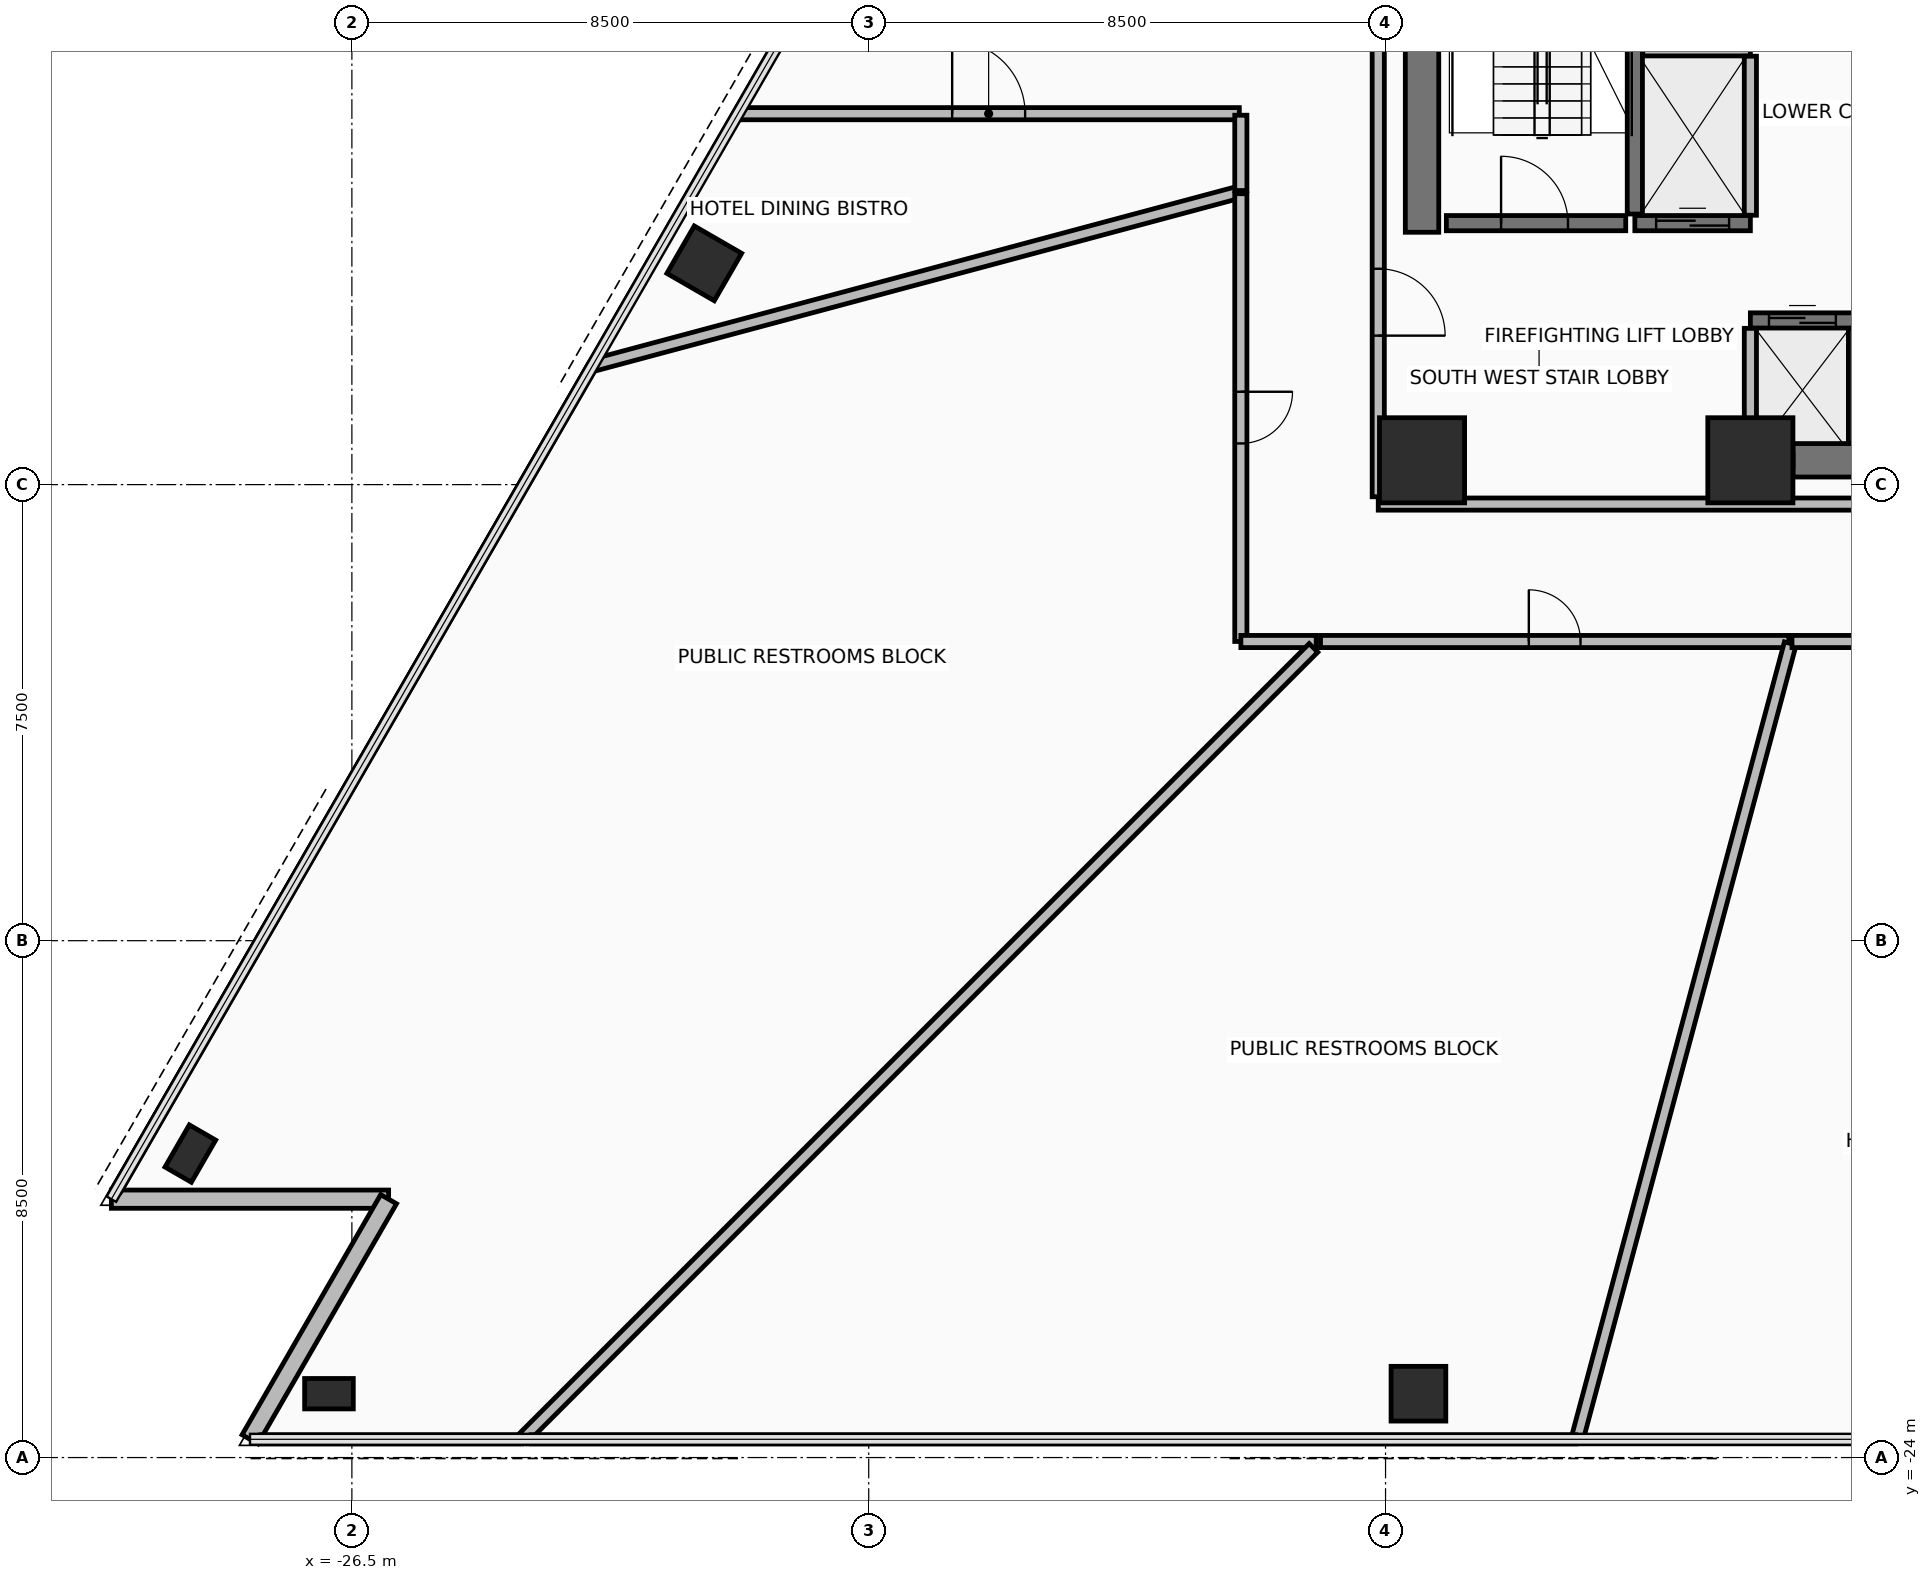
"""IFC4 building model, lengths in metres.
Left out: names, types, materials, properties, quantities, classifications, styles, units other than length and angle.
Written with IfcOpenShell. Run it as: python <this file> out.ifc"""

import sys

from ifc_helpers import new_model, si_unit, direction, frame, frame_2d, origin, origin_2d, place, context, subcontext, project, spatial, rectangle, hollow_rectangle, extrude, element, fill, save


model = new_model("IFC4")
c1 = context("Model", 3, precision=1e-05, world=origin(), true_north=direction((0.0, 1.0)))
c2 = subcontext(c1, "Body", "Model", "MODEL_VIEW")
j1 = project(units=[si_unit("LENGTHUNIT", "METRE"), si_unit("PLANEANGLEUNIT", "RADIAN")], contexts=[c1])
p1 = place(None, origin())
s1 = spatial("IfcSite", under=j1, at=p1, CompositionType="ELEMENT")
p2 = place(p1, origin())
s2 = spatial("IfcBuilding", under=s1, at=p2, CompositionType="ELEMENT")
p3 = place(p2, frame((0.0, 0.0, 52.25)))
s3 = spatial("IfcBuildingStorey", under=s2, at=p3, CompositionType="ELEMENT", Elevation=52.25)
for number, where, z_axis, x_axis in (
    (1, (-8.9, -7.6, 0.0), (0.0, 0.0, 1.0), (1.0, 0.0, 0.0)),
    (2, (-3.5, -7.6, 0.0), (0.0, 0.0, 1.0), (1.0, 0.0, 0.0)),
):
    element("IfcColumn", number, at=place(p3, frame(where, z_axis=z_axis, x_axis=x_axis)), inside=s3, PredefinedType="COLUMN", context=c2, shape_type="SweptSolid", body=[
        extrude(rectangle(XDim=1.4, YDim=1.4, at=origin_2d()), origin(), (0.0, 0.0, 1.0), 4.75),
    ])
p4 = place(p3, frame((-20.705, -4.361, 0.0), z_axis=(0.0, 0.0, 1.0), x_axis=(0.500001511499, 0.866024531118, 0.0)))
e3 = element("IfcColumn", 3, at=p4, inside=s3, PredefinedType="COLUMN", context=c2, shape_type="SweptSolid", body=[
    extrude(hollow_rectangle(XDim=0.9, YDim=0.9, WallThickness=0.05, at=origin_2d()), origin(), (0.0, 0.0, 1.0), 4.75),
])
for number, where, z_axis, x_axis in (
    (4, (-29.157, -19.001, 0.0), (0.0, 0.0, 1.0), (0.5, 0.866, 0.0)),
    (5, (-26.877, -22.95, 0.0), (0.0, 0.0, 1.0), (1.0, 0.0, 0.0)),
):
    element("IfcColumn", number, at=place(p3, frame(where, z_axis=z_axis, x_axis=x_axis)), inside=s3, PredefinedType="COLUMN", context=c2, shape_type="SweptSolid", body=[
        extrude(hollow_rectangle(XDim=0.5, YDim=0.8, WallThickness=0.04, at=origin_2d()), origin(), (0.0, 0.0, 1.0), 4.75),
    ])
p5 = place(p3, frame((-8.959, -22.95, 0.0), z_axis=(0.0, 0.0, 1.0), x_axis=(1.0, 0.0, 0.0)))
e6 = element("IfcColumn", 6, at=p5, inside=s3, PredefinedType="COLUMN", context=c2, shape_type="SweptSolid", body=[
    extrude(hollow_rectangle(XDim=0.9, YDim=0.9, WallThickness=0.05, at=origin_2d()), origin(), (0.0, 0.0, 1.0), 4.75),
])
p6 = place(p3, frame((-30.456, -19.751, 0.0), z_axis=(0.0, 0.0, 1.0), x_axis=(1.0, 0.0, 0.0)))
e7 = element("IfcWall", 7, at=p6, inside=s3, PredefinedType="STANDARD", context=c2, shape_type="SweptSolid", body=[
    extrude(rectangle(XDim=4.56, YDim=0.3, at=frame_2d((2.28, 0.0))), origin(), (0.0, 0.0, 1.0), 2.255),
])
p7 = place(p3, frame((-25.896, -19.751, 0.0), z_axis=(0.0, 0.0, 1.0), x_axis=(-0.500014431597, -0.866017071537, 0.0)))
e8 = element("IfcWall", 8, at=p7, inside=s3, PredefinedType="STANDARD", context=c2, shape_type="SweptSolid", body=[
    extrude(rectangle(XDim=4.56, YDim=0.3, at=frame_2d((2.28, 0.0))), origin(), (0.0, 0.0, 1.0), 2.255),
])
p8 = place(p3, frame((-2.8, -7.6, 0.0), z_axis=(0.0, 0.0, 1.0), x_axis=(1.0, 0.0, 0.0)))
e9 = element("IfcWall", 9, at=p8, inside=s3, PredefinedType="SHEAR", context=c2, shape_type="SweptSolid", body=[
    extrude(rectangle(XDim=5.38, YDim=0.55, at=frame_2d((2.69, 0.0))), origin(), (0.0, 0.0, 1.0), 4.56),
])
p9 = place(p3, frame((-8.9, -3.85, 0.0), z_axis=(0.0, 0.0, 1.0), x_axis=(0.0, 1.0, 0.0)))
e10 = element("IfcWall", 10, at=p9, inside=s3, PredefinedType="SHEAR", context=c2, shape_type="SweptSolid", body=[
    extrude(rectangle(XDim=10.7, YDim=0.55, at=frame_2d((5.35, 0.0))), origin(), (0.0, 0.0, 1.0), 4.56),
])
p10 = place(p3, frame((-9.62, -8.32, 0.0), z_axis=(0.0, 0.0, 1.0), x_axis=(1.0, 0.0, 0.0)))
e11 = element("IfcWall", 11, at=p10, inside=s3, PredefinedType="PARTITIONING", context=c2, shape_type="SweptSolid", body=[
    extrude(rectangle(XDim=19.24, YDim=0.2, at=frame_2d((9.62, 0.0))), origin(), (0.0, 0.0, 1.0), 2.355),
])
p11 = place(p10, frame((13.97, 0.0, 0.0)))
e12 = element("IfcOpeningElement", 12, at=p11, cuts=e11, PredefinedType="OPENING", context=c2, shape_type="SweptSolid", body=[
    extrude(rectangle(XDim=0.9, YDim=2.1, at=frame_2d((0.45, 1.05))), frame((0.0, 0.11, 0.0), z_axis=(0.0, -1.0, 0.0), x_axis=(1.0, 0.0, 0.0)), (0.0, 0.0, 1.0), 0.22),
])
p12 = place(p3, frame((-9.62, 8.2, 0.0), z_axis=(0.0, 0.0, 1.0), x_axis=(0.0, -1.0, 0.0)))
e13 = element("IfcWall", 13, at=p12, inside=s3, PredefinedType="PARTITIONING", context=c2, shape_type="SweptSolid", body=[
    extrude(rectangle(XDim=16.4, YDim=0.2, at=frame_2d((8.2, 0.0))), origin(), (0.0, 0.0, 1.0), 2.355),
])
p13 = place(p12, frame((12.65, 0.0, 0.0)))
e14 = element("IfcOpeningElement", 14, at=p13, cuts=e13, PredefinedType="OPENING", context=c2, shape_type="SweptSolid", body=[
    extrude(rectangle(XDim=1.1, YDim=2.15, at=frame_2d((0.55, 1.075))), frame((0.0, 0.11, 0.0), z_axis=(0.0, -1.0, 0.0), x_axis=(1.0, 0.0, 0.0)), (0.0, 0.0, 1.0), 0.22),
])
p14 = place(p3, frame((-5.4, -3.55, 0.0), z_axis=(0.0, 0.0, 1.0), x_axis=(0.0, 1.0, 0.0)))
e15 = element("IfcWall", 15, at=p14, inside=s3, PredefinedType="SHEAR", context=c2, shape_type="SweptSolid", body=[
    extrude(rectangle(XDim=7.3, YDim=0.25, at=frame_2d((3.65, 0.0))), origin(), (0.0, 0.0, 1.0), 4.56),
])
p15 = place(p3, frame((-8.5, -3.7, 0.0), z_axis=(0.0, 0.0, 1.0), x_axis=(1.0, 0.0, 0.0)))
e16 = element("IfcWall", 16, at=p15, inside=s3, PredefinedType="SHEAR", context=c2, shape_type="SweptSolid", body=[
    extrude(rectangle(XDim=2.95, YDim=0.25, at=frame_2d((1.475, 0.0))), origin(), (0.0, 0.0, 1.0), 4.56),
])
p16 = place(p15, frame((0.9, 0.0, 0.0)))
e17 = element("IfcOpeningElement", 17, at=p16, cuts=e16, PredefinedType="OPENING", context=c2, shape_type="SweptSolid", body=[
    extrude(rectangle(XDim=1.1, YDim=2.15, at=frame_2d((0.55, 1.075))), frame((0.0, 0.135, 0.0), z_axis=(0.0, -1.0, 0.0), x_axis=(1.0, 0.0, 0.0)), (0.0, 0.0, 1.0), 0.27),
])
p17 = place(p3, frame((-3.5, -5.3, 0.0), z_axis=(0.0, 0.0, 1.0), x_axis=(1.0, 0.0, 0.0)))
e18 = element("IfcWall", 18, at=p17, inside=s3, PredefinedType="SHEAR", context=c2, shape_type="SweptSolid", body=[
    extrude(rectangle(XDim=1.712, YDim=0.25, at=frame_2d((0.856, 0.0))), origin(), (0.0, 0.0, 1.0), 4.56),
])
p18 = place(p17, frame((0.306, 0.0, 0.0)))
e19 = element("IfcOpeningElement", 19, at=p18, cuts=e18, PredefinedType="OPENING", context=c2, shape_type="SweptSolid", body=[
    extrude(rectangle(XDim=1.1, YDim=2.2, at=frame_2d((0.55, 1.1))), frame((0.0, 0.135, 0.0), z_axis=(0.0, -1.0, 0.0), x_axis=(1.0, 0.0, 0.0)), (0.0, 0.0, 1.0), 0.27),
])
p19 = place(p3, frame((-3.5, -7.6, 0.0), z_axis=(0.0, 0.0, 1.0), x_axis=(1.0, 0.0, 0.0)))
e20 = element("IfcWall", 20, at=p19, inside=s3, PredefinedType="PARTITIONING", context=c2, shape_type="SweptSolid", body=[
    extrude(rectangle(XDim=0.7, YDim=0.2, at=frame_2d((0.35, 0.0))), origin(), (0.0, 0.0, 1.0), 3.755),
])
p20 = place(p3, frame((-3.5, -7.495, 0.0), z_axis=(0.0, 0.0, 1.0), x_axis=(0.0, 1.0, 0.0)))
e21 = element("IfcWall", 21, at=p20, inside=s3, PredefinedType="PARTITIONING", context=c2, shape_type="SweptSolid", body=[
    extrude(rectangle(XDim=2.065, YDim=0.2, at=frame_2d((1.033, 0.0))), origin(), (0.0, 0.0, 1.0), 3.755),
])
p21 = place(p3, frame((-1.788, -7.32, 0.0), z_axis=(0.0, 0.0, 1.0), x_axis=(0.0, 1.0, 0.0)))
e22 = element("IfcWall", 22, at=p21, inside=s3, PredefinedType="PARTITIONING", context=c2, shape_type="SweptSolid", body=[
    extrude(rectangle(XDim=1.89, YDim=0.2, at=frame_2d((0.945, 0.0))), origin(), (0.0, 0.0, 1.0), 4.56),
])
p22 = place(p3, frame((-5.4, -3.7, 0.0), z_axis=(0.0, 0.0, 1.0), x_axis=(1.0, 0.0, 0.0)))
e23 = element("IfcWall", 23, at=p22, inside=s3, PredefinedType="SHEAR", context=c2, shape_type="SweptSolid", body=[
    extrude(rectangle(XDim=1.9, YDim=0.25, at=frame_2d((0.95, 0.0))), origin(), (0.0, 0.0, 1.0), 4.56),
])
p23 = place(p22, frame((0.35, 0.0, 0.0)))
e24 = element("IfcOpeningElement", 24, at=p23, cuts=e23, PredefinedType="OPENING", context=c2, shape_type="SweptSolid", body=[
    extrude(rectangle(XDim=1.2, YDim=2.2, at=frame_2d((0.6, 1.1))), frame((0.0, 0.135, 0.0), z_axis=(0.0, -1.0, 0.0), x_axis=(1.0, 0.0, 0.0)), (0.0, 0.0, 1.0), 0.27),
])
p24 = place(p3, frame((-5.27, -0.85, 0.0), z_axis=(0.0, 0.0, 1.0), x_axis=(1.0, 0.0, 0.0)))
e25 = element("IfcWall", 25, at=p24, inside=s3, PredefinedType="PARTITIONING", context=c2, shape_type="SweptSolid", body=[
    extrude(rectangle(XDim=1.77, YDim=0.2, at=frame_2d((0.885, 0.0))), origin(), (0.0, 0.0, 1.0), 4.56),
])
p25 = place(p3, frame((-3.5, -3.57, 0.0), z_axis=(0.0, 0.0, 1.0), x_axis=(0.0, 1.0, 0.0)))
e26 = element("IfcWall", 26, at=p25, inside=s3, PredefinedType="PARTITIONING", context=c2, shape_type="SweptSolid", body=[
    extrude(rectangle(XDim=2.615, YDim=0.2, at=frame_2d((1.308, 0.0))), origin(), (0.0, 0.0, 1.0), 4.56),
])
p26 = place(p3, frame((-30.366, -19.596, 0.0), z_axis=(0.0, 0.0, 1.0), x_axis=(0.499991293932, 0.866030430177, 0.0)))
e27 = element("IfcWall", 27, at=p26, inside=s3, PredefinedType="PARTITIONING", context=c2, shape_type="SweptSolid", body=[
    extrude(rectangle(XDim=15.643, YDim=0.15, at=frame_2d((7.822, 0.0))), origin(), (0.0, 0.0, 1.0), 4.56),
])
p27 = place(p3, frame((-22.53, -6.037, 0.0), z_axis=(0.0, 0.0, 1.0), x_axis=(0.965922374415, 0.258831927328, 0.0)))
e28 = element("IfcWall", 28, at=p27, inside=s3, PredefinedType="PARTITIONING", context=c2, shape_type="SweptSolid", body=[
    extrude(rectangle(XDim=10.992, YDim=0.2, at=frame_2d((5.496, 0.0))), origin(), (0.0, 0.0, 1.0), 2.255),
])
p28 = place(p3, frame((-11.88, -3.216, 0.0), z_axis=(0.0, 0.0, 1.0), x_axis=(0.0, -1.0, 0.0)))
e29 = element("IfcWall", 29, at=p28, inside=s3, PredefinedType="PARTITIONING", context=c2, shape_type="SweptSolid", body=[
    extrude(rectangle(XDim=7.364, YDim=0.2, at=frame_2d((3.682, 0.0))), origin(), (0.0, 0.0, 1.0), 2.355),
])
p29 = place(p28, frame((3.257, 0.0, 0.0)))
e30 = element("IfcOpeningElement", 30, at=p29, cuts=e29, PredefinedType="OPENING", context=c2, shape_type="SweptSolid", body=[
    extrude(rectangle(XDim=0.85, YDim=2.1, at=frame_2d((0.425, 1.05))), frame((0.0, 0.11, 0.0), z_axis=(0.0, -1.0, 0.0), x_axis=(1.0, 0.0, 0.0)), (0.0, 0.0, 1.0), 0.22),
])
p30 = place(p3, frame((-11.879, -10.58, 0.0), z_axis=(0.0, 0.0, 1.0), x_axis=(1.0, 0.0, 0.0)))
e31 = element("IfcWall", 31, at=p30, inside=s3, PredefinedType="PARTITIONING", context=c2, shape_type="SweptSolid", body=[
    extrude(rectangle(XDim=1.239, YDim=0.2, at=frame_2d((0.62, 0.0))), origin(), (0.0, 0.0, 1.0), 2.355),
])
p31 = place(p3, frame((-10.685, -10.685, 0.0), z_axis=(0.0, 0.0, 1.0), x_axis=(-0.707106781187, -0.707106781187, 0.0)))
e32 = element("IfcWall", 32, at=p31, inside=s3, PredefinedType="PARTITIONING", context=c2, shape_type="SweptSolid", body=[
    extrude(rectangle(XDim=18.396, YDim=0.2, at=frame_2d((9.198, 0.0))), origin(), (0.0, 0.0, 1.0), 2.255),
])
p32 = place(p3, frame((-23.71, -23.7, 0.0), z_axis=(0.0, 0.0, 1.0), x_axis=(-1.0, 0.0, 0.0)))
e33 = element("IfcWall", 33, at=p32, inside=s3, PredefinedType="PARTITIONING", context=c2, shape_type="SweptSolid", body=[
    extrude(rectangle(XDim=4.286, YDim=0.15, at=frame_2d((2.143, 0.0))), origin(), (0.0, 0.0, 1.0), 3.055),
])
p33 = place(p3, frame((-10.57, -10.58, 0.0), z_axis=(0.0, 0.0, 1.0), x_axis=(1.0, 0.0, 0.0)))
e34 = element("IfcWall", 34, at=p33, inside=s3, PredefinedType="PARTITIONING", context=c2, shape_type="SweptSolid", body=[
    extrude(rectangle(XDim=7.702, YDim=0.2, at=frame_2d((3.851, 0.0))), origin(), (0.0, 0.0, 1.0), 2.355),
])
p34 = place(p33, frame((3.426, 0.0, 0.0)))
e35 = element("IfcOpeningElement", 35, at=p34, cuts=e34, PredefinedType="OPENING", context=c2, shape_type="SweptSolid", body=[
    extrude(rectangle(XDim=0.85, YDim=2.1, at=frame_2d((0.425, 1.05))), frame((0.0, 0.11, 0.0), z_axis=(0.0, -1.0, 0.0), x_axis=(1.0, 0.0, 0.0)), (0.0, 0.0, 1.0), 0.22),
])
p35 = place(p3, frame((-2.843, -10.612, 0.0), z_axis=(0.0, 0.0, 1.0), x_axis=(-0.25882927933, -0.965923083978, 0.0)))
e36 = element("IfcWall", 36, at=p35, inside=s3, PredefinedType="PARTITIONING", context=c2, shape_type="SweptSolid", body=[
    extrude(rectangle(XDim=13.531, YDim=0.2, at=frame_2d((6.766, 0.0))), origin(), (0.0, 0.0, 1.0), 2.255),
])
p36 = place(p3, frame((-6.37, -23.7, 0.0), z_axis=(0.0, 0.0, 1.0), x_axis=(-1.0, 0.0, 0.0)))
e37 = element("IfcWall", 37, at=p36, inside=s3, PredefinedType="PARTITIONING", context=c2, shape_type="SweptSolid", body=[
    extrude(rectangle(XDim=17.182, YDim=0.15, at=frame_2d((8.591, 0.0))), origin(), (0.0, 0.0, 1.0), 2.355),
])
p37 = place(p3, frame((-20.15, -1.9, 0.0), z_axis=(0.0, 0.0, 1.0), x_axis=(1.0, 0.0, 0.0)))
e38 = element("IfcWall", 38, at=p37, inside=s3, PredefinedType="PARTITIONING", context=c2, shape_type="SweptSolid", body=[
    extrude(rectangle(XDim=8.245, YDim=0.2, at=frame_2d((4.122, 0.0))), origin(), (0.0, 0.0, 1.0), 2.255),
])
p38 = place(p37, frame((3.522, 0.0, 0.0)))
e39 = element("IfcOpeningElement", 39, at=p38, cuts=e38, PredefinedType="OPENING", context=c2, shape_type="SweptSolid", body=[
    extrude(rectangle(XDim=1.2, YDim=2.15, at=frame_2d((0.6, 1.075))), frame((0.0, 0.11, 0.0), z_axis=(0.0, -1.0, 0.0), x_axis=(1.0, 0.0, 0.0)), (0.0, 0.0, 1.0), 0.22),
])
p39 = place(p3, frame((-11.88, -1.925, 0.0), z_axis=(0.0, 0.0, 1.0), x_axis=(0.0, -1.0, 0.0)))
e40 = element("IfcWall", 40, at=p39, inside=s3, PredefinedType="PARTITIONING", context=c2, shape_type="SweptSolid", body=[
    extrude(rectangle(XDim=1.239, YDim=0.2, at=frame_2d((0.62, 0.0))), origin(), (0.0, 0.0, 1.0), 4.56),
])
p40 = place(p3, frame((-2.816, -10.58, 0.0), z_axis=(0.0, 0.0, 1.0), x_axis=(1.0, 0.0, 0.0)))
e41 = element("IfcWall", 41, at=p40, inside=s3, PredefinedType="PARTITIONING", context=c2, shape_type="SweptSolid", body=[
    extrude(rectangle(XDim=5.631, YDim=0.2, at=frame_2d((2.816, 0.0))), origin(), (0.0, 0.0, 1.0), 4.56),
])
p41 = place(p40, frame((2.216, 0.0, 0.0)))
e42 = element("IfcOpeningElement", 42, at=p41, cuts=e41, PredefinedType="OPENING", context=c2, shape_type="SweptSolid", body=[
    extrude(rectangle(XDim=1.2, YDim=2.15, at=frame_2d((0.6, 1.075))), frame((0.0, 0.11, 0.0), z_axis=(0.0, -1.0, 0.0), x_axis=(1.0, 0.0, 0.0)), (0.0, 0.0, 1.0), 0.22),
])
p42 = place(p13, frame((1.1, 0.0, 0.0), z_axis=(0.0, 0.0, 1.0), x_axis=(-1.0, 0.0, 0.0)))
e43 = element("IfcDoor", 43, at=p42, inside=s3, OperationType="SINGLE_SWING_LEFT", PredefinedType="DOOR", context=c2, shape_type="SweptSolid", body=[
    extrude(rectangle(XDim=1.1, YDim=2.15, at=frame_2d((0.55, 1.075))), frame((0.0, 0.025, 0.0), z_axis=(0.0, -1.0, 0.0), x_axis=(1.0, 0.0, 0.0)), (0.0, 0.0, 1.0), 0.05),
])
fill(e14, e43)
p43 = place(p16, origin())
e44 = element("IfcDoor", 44, at=p43, inside=s3, OperationType="SINGLE_SWING_LEFT", PredefinedType="DOOR", context=c2, shape_type="SweptSolid", body=[
    extrude(rectangle(XDim=1.1, YDim=2.15, at=frame_2d((0.55, 1.075))), frame((0.0, 0.025, 0.0), z_axis=(0.0, -1.0, 0.0), x_axis=(1.0, 0.0, 0.0)), (0.0, 0.0, 1.0), 0.05),
])
fill(e17, e44)
p44 = place(p18, origin())
e45 = element("IfcDoor", 45, at=p44, inside=s3, OperationType="SLIDING_TO_LEFT", PredefinedType="DOOR", context=c2, shape_type="SweptSolid", body=[
    extrude(rectangle(XDim=1.1, YDim=2.2, at=frame_2d((0.55, 1.1))), frame((0.0, 0.025, 0.0), z_axis=(0.0, -1.0, 0.0), x_axis=(1.0, 0.0, 0.0)), (0.0, 0.0, 1.0), 0.05),
])
fill(e19, e45)
p45 = place(p23, origin())
e46 = element("IfcDoor", 46, at=p45, inside=s3, OperationType="SLIDING_TO_RIGHT", PredefinedType="DOOR", context=c2, shape_type="SweptSolid", body=[
    extrude(rectangle(XDim=1.2, YDim=2.2, at=frame_2d((0.6, 1.1))), frame((0.0, 0.025, 0.0), z_axis=(0.0, -1.0, 0.0), x_axis=(1.0, 0.0, 0.0)), (0.0, 0.0, 1.0), 0.05),
])
fill(e24, e46)
p46 = place(p29, origin())
e47 = element("IfcDoor", 47, at=p46, inside=s3, OperationType="SINGLE_SWING_RIGHT", PredefinedType="DOOR", context=c2, shape_type="SweptSolid", body=[
    extrude(rectangle(XDim=0.85, YDim=2.1, at=frame_2d((0.425, 1.05))), frame((0.0, 0.025, 0.0), z_axis=(0.0, -1.0, 0.0), x_axis=(1.0, 0.0, 0.0)), (0.0, 0.0, 1.0), 0.05),
])
fill(e30, e47)
p47 = place(p34, origin())
e48 = element("IfcDoor", 48, at=p47, inside=s3, OperationType="SINGLE_SWING_RIGHT", PredefinedType="DOOR", context=c2, shape_type="SweptSolid", body=[
    extrude(rectangle(XDim=0.85, YDim=2.1, at=frame_2d((0.425, 1.05))), frame((0.0, 0.025, 0.0), z_axis=(0.0, -1.0, 0.0), x_axis=(1.0, 0.0, 0.0)), (0.0, 0.0, 1.0), 0.05),
])
fill(e35, e48)
p48 = place(p38, origin())
e49 = element("IfcDoor", 49, at=p48, inside=s3, OperationType="SINGLE_SWING_LEFT", PredefinedType="DOOR", context=c2, shape_type="SweptSolid", body=[
    extrude(rectangle(XDim=1.2, YDim=2.15, at=frame_2d((0.6, 1.075))), frame((0.0, 0.025, 0.0), z_axis=(0.0, -1.0, 0.0), x_axis=(1.0, 0.0, 0.0)), (0.0, 0.0, 1.0), 0.05),
])
fill(e39, e49)
save(model, sys.argv[1])
